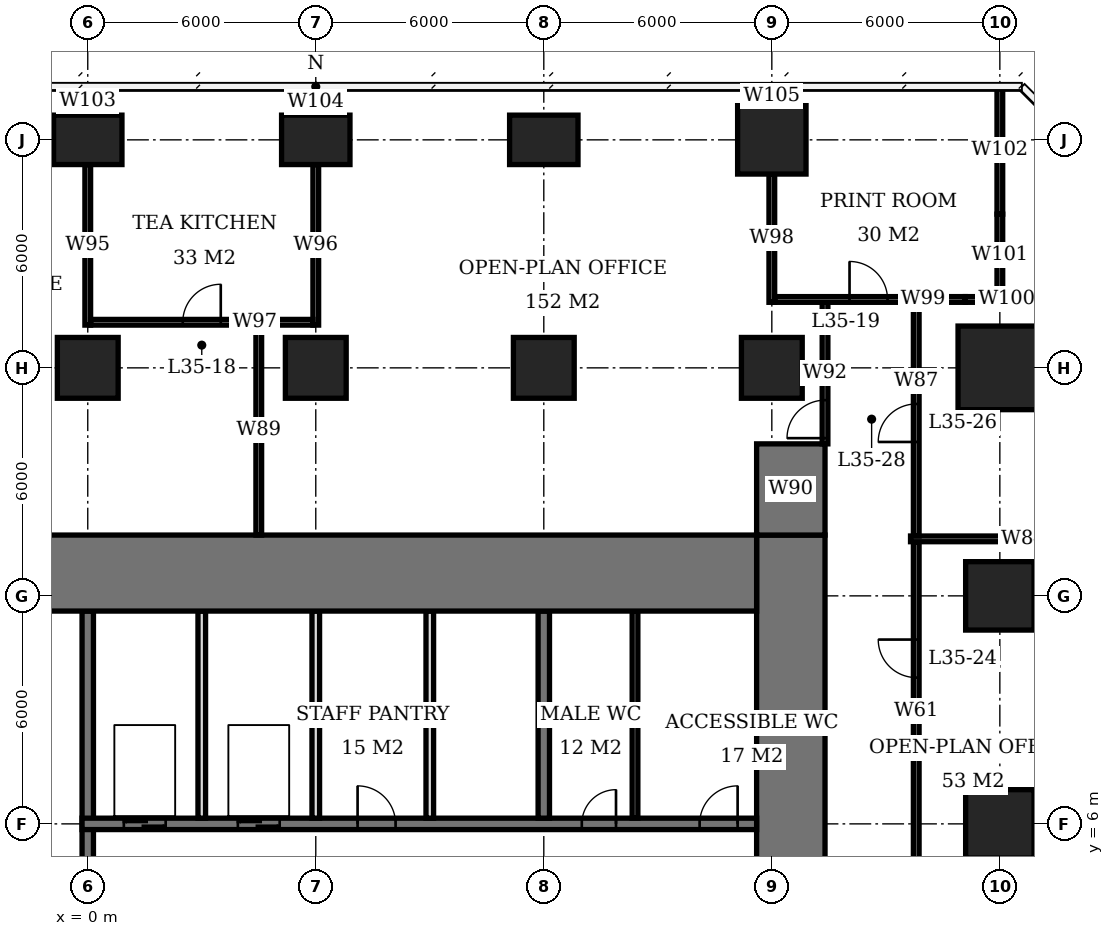
"""IFC4 building model, lengths in metres.
Left out: names, types, materials, properties, quantities, classifications, styles, units other than length and angle.
Written with IfcOpenShell. Run it as: python <this file> out.ifc"""

import sys

from ifc_helpers import new_model, si_unit, direction, frame, frame_2d, origin, origin_2d, place, context, subcontext, project, spatial, rectangle, extrude, element, fill, save


model = new_model("IFC4")
c1 = context("Model", 3, precision=1e-05, world=origin(), true_north=direction((0.0, 1.0)))
c2 = subcontext(c1, "Body", "Model", "MODEL_VIEW")
j1 = project(units=[si_unit("LENGTHUNIT", "METRE"), si_unit("PLANEANGLEUNIT", "RADIAN")], contexts=[c1])
p1 = place(None, origin())
s1 = spatial("IfcSite", under=j1, at=p1, CompositionType="ELEMENT")
p2 = place(p1, origin())
s2 = spatial("IfcBuilding", under=s1, at=p2, CompositionType="ELEMENT")
p3 = place(p2, frame((0.0, 0.0, 144.5)))
s3 = spatial("IfcBuildingStorey", under=s2, at=p3, CompositionType="ELEMENT", Elevation=144.5)
p4 = place(p3, frame((0.0, 18.0, 0.0), z_axis=(0.0, 0.0, 1.0), x_axis=(1.0, 0.0, 0.0)))
e1 = element("IfcColumn", 1, at=p4, inside=s3, PredefinedType="COLUMN", context=c2, shape_type="SweptSolid", body=[
    extrude(rectangle(XDim=1.6, YDim=1.6, at=origin_2d()), origin(), (0.0, 0.0, 1.0), 3.9),
])
p5 = place(p3, frame((0.0, 24.0, 0.0), z_axis=(0.0, 0.0, 1.0), x_axis=(1.0, 0.0, 0.0)))
e2 = element("IfcColumn", 2, at=p5, inside=s3, PredefinedType="COLUMN", context=c2, shape_type="SweptSolid", body=[
    extrude(rectangle(XDim=1.8, YDim=1.3, at=origin_2d()), origin(), (0.0, 0.0, 1.0), 3.9),
])
p6 = place(p3, frame((6.0, 18.0, 0.0), z_axis=(0.0, 0.0, 1.0), x_axis=(1.0, 0.0, 0.0)))
e3 = element("IfcColumn", 3, at=p6, inside=s3, PredefinedType="COLUMN", context=c2, shape_type="SweptSolid", body=[
    extrude(rectangle(XDim=1.6, YDim=1.6, at=origin_2d()), origin(), (0.0, 0.0, 1.0), 3.9),
])
p7 = place(p3, frame((6.0, 24.0, 0.0), z_axis=(0.0, 0.0, 1.0), x_axis=(1.0, 0.0, 0.0)))
e4 = element("IfcColumn", 4, at=p7, inside=s3, PredefinedType="COLUMN", context=c2, shape_type="SweptSolid", body=[
    extrude(rectangle(XDim=1.8, YDim=1.3, at=origin_2d()), origin(), (0.0, 0.0, 1.0), 3.9),
])
p8 = place(p3, frame((12.0, 18.0, 0.0), z_axis=(0.0, 0.0, 1.0), x_axis=(1.0, 0.0, 0.0)))
e5 = element("IfcColumn", 5, at=p8, inside=s3, PredefinedType="COLUMN", context=c2, shape_type="SweptSolid", body=[
    extrude(rectangle(XDim=1.6, YDim=1.6, at=origin_2d()), origin(), (0.0, 0.0, 1.0), 3.9),
])
p9 = place(p3, frame((12.0, 24.0, 0.0), z_axis=(0.0, 0.0, 1.0), x_axis=(1.0, 0.0, 0.0)))
e6 = element("IfcColumn", 6, at=p9, inside=s3, PredefinedType="COLUMN", context=c2, shape_type="SweptSolid", body=[
    extrude(rectangle(XDim=1.8, YDim=1.3, at=origin_2d()), origin(), (0.0, 0.0, 1.0), 3.9),
])
p10 = place(p3, frame((18.0, 18.0, 0.0), z_axis=(0.0, 0.0, 1.0), x_axis=(1.0, 0.0, 0.0)))
e7 = element("IfcColumn", 7, at=p10, inside=s3, PredefinedType="COLUMN", context=c2, shape_type="SweptSolid", body=[
    extrude(rectangle(XDim=1.6, YDim=1.6, at=origin_2d()), origin(), (0.0, 0.0, 1.0), 3.9),
])
for number, where, z_axis, x_axis in (
    (8, (18.0, 24.0, 0.0), (0.0, 0.0, 1.0), (1.0, 0.0, 0.0)),
    (9, (24.0, 6.0, 0.0), (0.0, 0.0, 1.0), (1.0, 0.0, 0.0)),
    (10, (24.0, 12.0, 0.0), (0.0, 0.0, 1.0), (1.0, 0.0, 0.0)),
):
    element("IfcColumn", number, at=place(p3, frame(where, z_axis=z_axis, x_axis=x_axis)), inside=s3, PredefinedType="COLUMN", context=c2, shape_type="SweptSolid", body=[
        extrude(rectangle(XDim=1.8, YDim=1.8, at=origin_2d()), origin(), (0.0, 0.0, 1.0), 3.9),
    ])
p11 = place(p3, frame((24.0, 18.0, 0.0), z_axis=(0.0, 0.0, 1.0), x_axis=(1.0, 0.0, 0.0)))
e11 = element("IfcColumn", 11, at=p11, inside=s3, PredefinedType="COLUMN", context=c2, shape_type="SweptSolid", body=[
    extrude(rectangle(XDim=2.2, YDim=2.2, at=origin_2d()), origin(), (0.0, 0.0, 1.0), 3.9),
])
p12 = place(p3, frame((-5.6, 12.6, 0.0), z_axis=(0.0, 0.0, 1.0), x_axis=(1.0, 0.0, 0.0)))
e12 = element("IfcWall", 12, at=p12, inside=s3, PredefinedType="SHEAR", context=c2, shape_type="SweptSolid", body=[
    extrude(rectangle(XDim=23.2, YDim=2.0, at=frame_2d((11.6, 0.0))), origin(), (0.0, 0.0, 1.0), 3.9),
])
p13 = place(p3, frame((18.5, -7.6, 0.0), z_axis=(0.0, 0.0, 1.0), x_axis=(0.0, 1.0, 0.0)))
e13 = element("IfcWall", 13, at=p13, inside=s3, PredefinedType="SHEAR", context=c2, shape_type="SweptSolid", body=[
    extrude(rectangle(XDim=21.2, YDim=1.8, at=frame_2d((10.6, 0.0))), origin(), (0.0, 0.0, 1.0), 3.9),
])
p14 = place(p13, frame((9.2, 0.0, 0.0)))
e14 = element("IfcOpeningElement", 14, at=p14, cuts=e13, PredefinedType="OPENING", context=c2, shape_type="SweptSolid", body=[
    extrude(rectangle(XDim=1.8, YDim=2.4, at=frame_2d((0.9, 1.2))), frame((0.0, 0.91, 0.0), z_axis=(0.0, -1.0, 0.0), x_axis=(1.0, 0.0, 0.0)), (0.0, 0.0, 1.0), 1.82),
])
p15 = place(p3, frame((18.5, 13.6, 0.0), z_axis=(0.0, 0.0, 1.0), x_axis=(0.0, 1.0, 0.0)))
e15 = element("IfcWall", 15, at=p15, inside=s3, PredefinedType="SHEAR", context=c2, shape_type="SweptSolid", body=[
    extrude(rectangle(XDim=2.4, YDim=1.8, at=frame_2d((1.2, 0.0))), origin(), (0.0, 0.0, 1.0), 3.9),
])
p16 = place(p3, frame((-0.15, 6.0, 0.0), z_axis=(0.0, 0.0, 1.0), x_axis=(1.0, 0.0, 0.0)))
e16 = element("IfcWall", 16, at=p16, inside=s3, PredefinedType="SHEAR", context=c2, shape_type="SweptSolid", body=[
    extrude(rectangle(XDim=17.75, YDim=0.3, at=frame_2d((8.875, 0.0))), origin(), (0.0, 0.0, 1.0), 3.9),
])
p17 = place(p16, frame((13.15, 0.0, 0.0)))
e17 = element("IfcOpeningElement", 17, at=p17, cuts=e16, PredefinedType="OPENING", context=c2, shape_type="SweptSolid", body=[
    extrude(rectangle(XDim=0.9, YDim=2.1, at=frame_2d((0.45, 1.05))), frame((0.0, 0.16, 0.0), z_axis=(0.0, -1.0, 0.0), x_axis=(1.0, 0.0, 0.0)), (0.0, 0.0, 1.0), 0.32),
])
p18 = place(p16, frame((16.25, 0.0, 0.0)))
e18 = element("IfcOpeningElement", 18, at=p18, cuts=e16, PredefinedType="OPENING", context=c2, shape_type="SweptSolid", body=[
    extrude(rectangle(XDim=1.0, YDim=2.1, at=frame_2d((0.5, 1.05))), frame((0.0, 0.16, 0.0), z_axis=(0.0, -1.0, 0.0), x_axis=(1.0, 0.0, 0.0)), (0.0, 0.0, 1.0), 0.32),
])
p19 = place(p16, frame((7.25, 0.0, 0.0)))
e19 = element("IfcOpeningElement", 19, at=p19, cuts=e16, PredefinedType="OPENING", context=c2, shape_type="SweptSolid", body=[
    extrude(rectangle(XDim=1.0, YDim=2.1, at=frame_2d((0.5, 1.05))), frame((0.0, 0.16, 0.0), z_axis=(0.0, -1.0, 0.0), x_axis=(1.0, 0.0, 0.0)), (0.0, 0.0, 1.0), 0.32),
])
p20 = place(p16, frame((1.1, 0.0, 0.0)))
e20 = element("IfcOpeningElement", 20, at=p20, cuts=e16, PredefinedType="OPENING", context=c2, shape_type="SweptSolid", body=[
    extrude(rectangle(XDim=1.1, YDim=2.1, at=frame_2d((0.55, 1.05))), frame((0.0, 0.16, 0.0), z_axis=(0.0, -1.0, 0.0), x_axis=(1.0, 0.0, 0.0)), (0.0, 0.0, 1.0), 0.32),
])
p21 = place(p16, frame((4.1, 0.0, 0.0)))
e21 = element("IfcOpeningElement", 21, at=p21, cuts=e16, PredefinedType="OPENING", context=c2, shape_type="SweptSolid", body=[
    extrude(rectangle(XDim=1.1, YDim=2.1, at=frame_2d((0.55, 1.05))), frame((0.0, 0.16, 0.0), z_axis=(0.0, -1.0, 0.0), x_axis=(1.0, 0.0, 0.0)), (0.0, 0.0, 1.0), 0.32),
])
p22 = place(p3, frame((0.0, 3.15, 0.0), z_axis=(0.0, 0.0, 1.0), x_axis=(0.0, 1.0, 0.0)))
e22 = element("IfcWall", 22, at=p22, inside=s3, PredefinedType="SHEAR", context=c2, shape_type="SweptSolid", body=[
    extrude(rectangle(XDim=8.45, YDim=0.3, at=frame_2d((4.225, 0.0))), origin(), (0.0, 0.0, 1.0), 3.9),
])
p23 = place(p3, frame((12.0, 6.15, 0.0), z_axis=(0.0, 0.0, 1.0), x_axis=(0.0, 1.0, 0.0)))
e23 = element("IfcWall", 23, at=p23, inside=s3, PredefinedType="SHEAR", context=c2, shape_type="SweptSolid", body=[
    extrude(rectangle(XDim=5.45, YDim=0.3, at=frame_2d((2.725, 0.0))), origin(), (0.0, 0.0, 1.0), 3.9),
])
for number, where, z_axis, x_axis in (
    (24, (3.0, 6.15, 0.0), (0.0, 0.0, 1.0), (0.0, 1.0, 0.0)),
    (25, (6.0, 6.15, 0.0), (0.0, 0.0, 1.0), (0.0, 1.0, 0.0)),
    (26, (9.0, 6.15, 0.0), (0.0, 0.0, 1.0), (0.0, 1.0, 0.0)),
):
    element("IfcWall", number, at=place(p3, frame(where, z_axis=z_axis, x_axis=x_axis)), inside=s3, PredefinedType="SOLIDWALL", context=c2, shape_type="SweptSolid", body=[
        extrude(rectangle(XDim=5.45, YDim=0.2, at=frame_2d((2.725, 0.0))), origin(), (0.0, 0.0, 1.0), 3.9),
    ])
p24 = place(p3, frame((14.4, 6.15, 0.0), z_axis=(0.0, 0.0, 1.0), x_axis=(0.0, 1.0, 0.0)))
e27 = element("IfcWall", 27, at=p24, inside=s3, PredefinedType="PLUMBINGWALL", context=c2, shape_type="SweptSolid", body=[
    extrude(rectangle(XDim=5.45, YDim=0.15, at=frame_2d((2.725, 0.0))), origin(), (0.0, 0.0, 1.0), 3.65),
])
p25 = place(p3, frame((0.075, 19.2, 0.0), z_axis=(0.0, 0.0, 1.0), x_axis=(1.0, 0.0, 0.0)))
e28 = element("IfcWall", 28, at=p25, inside=s3, PredefinedType="PARTITIONING", context=c2, shape_type="SweptSolid", body=[
    extrude(rectangle(XDim=5.85, YDim=0.15, at=frame_2d((2.925, 0.0))), origin(), (0.0, 0.0, 1.0), 3.65),
])
p26 = place(p25, frame((2.425, 0.0, 0.0)))
e29 = element("IfcOpeningElement", 29, at=p26, cuts=e28, PredefinedType="OPENING", context=c2, shape_type="SweptSolid", body=[
    extrude(rectangle(XDim=1.0, YDim=2.1, at=frame_2d((0.5, 1.05))), frame((0.0, 0.085, 0.0), z_axis=(0.0, -1.0, 0.0), x_axis=(1.0, 0.0, 0.0)), (0.0, 0.0, 1.0), 0.17),
])
p27 = place(p3, frame((18.075, 19.8, 0.0), z_axis=(0.0, 0.0, 1.0), x_axis=(1.0, 0.0, 0.0)))
e30 = element("IfcWall", 30, at=p27, inside=s3, PredefinedType="PARTITIONING", context=c2, shape_type="SweptSolid", body=[
    extrude(rectangle(XDim=5.015, YDim=0.15, at=frame_2d((2.508, 0.0))), origin(), (0.0, 0.0, 1.0), 3.65),
])
p28 = place(p27, frame((1.97, 0.0, 0.0)))
e31 = element("IfcOpeningElement", 31, at=p28, cuts=e30, PredefinedType="OPENING", context=c2, shape_type="SweptSolid", body=[
    extrude(rectangle(XDim=1.0, YDim=2.1, at=frame_2d((0.5, 1.05))), frame((0.0, 0.085, 0.0), z_axis=(0.0, -1.0, 0.0), x_axis=(1.0, 0.0, 0.0)), (0.0, 0.0, 1.0), 0.17),
])
p29 = place(p3, frame((23.09, 19.8, 0.0), z_axis=(0.0, 0.0, 1.0), x_axis=(1.0, 0.0, 0.0)))
e32 = element("IfcWall", 32, at=p29, inside=s3, PredefinedType="PARTITIONING", context=c2, shape_type="SweptSolid", body=[
    extrude(rectangle(XDim=0.985, YDim=0.15, at=frame_2d((0.492, 0.0))), origin(), (0.0, 0.0, 1.0), 2.65),
])
p30 = place(p3, frame((0.0, 19.125, 0.0), z_axis=(0.0, 0.0, 1.0), x_axis=(0.0, 1.0, 0.0)))
e33 = element("IfcWall", 33, at=p30, inside=s3, PredefinedType="PARTITIONING", context=c2, shape_type="SweptSolid", body=[
    extrude(rectangle(XDim=4.225, YDim=0.15, at=frame_2d((2.113, 0.0))), origin(), (0.0, 0.0, 1.0), 3.65),
])
p31 = place(p3, frame((0.0, 24.65, 0.0), z_axis=(0.0, 0.0, 1.0), x_axis=(0.0, 1.0, 0.0)))
e34 = element("IfcWall", 34, at=p31, inside=s3, PredefinedType="PARTITIONING", context=c2, shape_type="SweptSolid", body=[
    extrude(rectangle(XDim=0.75, YDim=0.15, at=frame_2d((0.375, 0.0))), origin(), (0.0, 0.0, 1.0), 3.65),
])
p32 = place(p3, frame((6.0, 19.125, 0.0), z_axis=(0.0, 0.0, 1.0), x_axis=(0.0, 1.0, 0.0)))
e35 = element("IfcWall", 35, at=p32, inside=s3, PredefinedType="PARTITIONING", context=c2, shape_type="SweptSolid", body=[
    extrude(rectangle(XDim=4.225, YDim=0.15, at=frame_2d((2.113, 0.0))), origin(), (0.0, 0.0, 1.0), 3.65),
])
p33 = place(p3, frame((6.0, 24.65, 0.0), z_axis=(0.0, 0.0, 1.0), x_axis=(0.0, 1.0, 0.0)))
e36 = element("IfcWall", 36, at=p33, inside=s3, PredefinedType="PARTITIONING", context=c2, shape_type="SweptSolid", body=[
    extrude(rectangle(XDim=0.7, YDim=0.15, at=frame_2d((0.35, 0.0))), origin(), (0.0, 0.0, 1.0), 3.65),
])
p34 = place(p3, frame((18.0, 19.725, 0.0), z_axis=(0.0, 0.0, 1.0), x_axis=(0.0, 1.0, 0.0)))
e37 = element("IfcWall", 37, at=p34, inside=s3, PredefinedType="PARTITIONING", context=c2, shape_type="SweptSolid", body=[
    extrude(rectangle(XDim=3.375, YDim=0.15, at=frame_2d((1.688, 0.0))), origin(), (0.0, 0.0, 1.0), 3.65),
])
p35 = place(p3, frame((18.0, 24.9, 0.0), z_axis=(0.0, 0.0, 1.0), x_axis=(0.0, 1.0, 0.0)))
e38 = element("IfcWall", 38, at=p35, inside=s3, PredefinedType="PARTITIONING", context=c2, shape_type="SweptSolid", body=[
    extrude(rectangle(XDim=0.5, YDim=0.15, at=frame_2d((0.25, 0.0))), origin(), (0.0, 0.0, 1.0), 3.65),
])
p36 = place(p3, frame((24.0, 19.875, 0.0), z_axis=(0.0, 0.0, 1.0), x_axis=(0.0, 1.0, 0.0)))
e39 = element("IfcWall", 39, at=p36, inside=s3, PredefinedType="PARTITIONING", context=c2, shape_type="SweptSolid", body=[
    extrude(rectangle(XDim=2.17, YDim=0.15, at=frame_2d((1.085, 0.0))), origin(), (0.0, 0.0, 1.0), 2.65),
])
p37 = place(p3, frame((24.0, 22.045, 0.0), z_axis=(0.0, 0.0, 1.0), x_axis=(0.0, 1.0, 0.0)))
e40 = element("IfcWall", 40, at=p37, inside=s3, PredefinedType="PARTITIONING", context=c2, shape_type="SweptSolid", body=[
    extrude(rectangle(XDim=3.355, YDim=0.15, at=frame_2d((1.677, 0.0))), origin(), (0.0, 0.0, 1.0), 3.65),
])
p38 = place(p3, frame((4.5, 13.6, 0.0), z_axis=(0.0, 0.0, 1.0), x_axis=(0.0, 1.0, 0.0)))
e41 = element("IfcWall", 41, at=p38, inside=s3, PredefinedType="PARTITIONING", context=c2, shape_type="SweptSolid", body=[
    extrude(rectangle(XDim=5.525, YDim=0.15, at=frame_2d((2.762, 0.0))), origin(), (0.0, 0.0, 1.0), 3.65),
])
p39 = place(p3, frame((19.4, 16.0, 0.0), z_axis=(0.0, 0.0, 1.0), x_axis=(0.0, 1.0, 0.0)))
e42 = element("IfcWall", 42, at=p39, inside=s3, PredefinedType="PARTITIONING", context=c2, shape_type="SweptSolid", body=[
    extrude(rectangle(XDim=3.725, YDim=0.15, at=frame_2d((1.863, 0.0))), origin(), (0.0, 0.0, 1.0), 3.65),
])
p40 = place(p39, frame((0.15, 0.0, 0.0)))
e43 = element("IfcOpeningElement", 43, at=p40, cuts=e42, PredefinedType="OPENING", context=c2, shape_type="SweptSolid", body=[
    extrude(rectangle(XDim=1.0, YDim=2.1, at=frame_2d((0.5, 1.05))), frame((0.0, 0.085, 0.0), z_axis=(0.0, -1.0, 0.0), x_axis=(1.0, 0.0, 0.0)), (0.0, 0.0, 1.0), 0.17),
])
p41 = place(p3, frame((21.8, 4.5, 0.0), z_axis=(0.0, 0.0, 1.0), x_axis=(0.0, 1.0, 0.0)))
e44 = element("IfcWall", 44, at=p41, inside=s3, PredefinedType="PARTITIONING", context=c2, shape_type="SweptSolid", body=[
    extrude(rectangle(XDim=8.925, YDim=0.15, at=frame_2d((4.462, 0.0))), origin(), (0.0, 0.0, 1.0), 3.65),
])
p42 = place(p41, frame((5.35, 0.0, 0.0)))
e45 = element("IfcOpeningElement", 45, at=p42, cuts=e44, PredefinedType="OPENING", context=c2, shape_type="SweptSolid", body=[
    extrude(rectangle(XDim=1.0, YDim=2.1, at=frame_2d((0.5, 1.05))), frame((0.0, 0.085, 0.0), z_axis=(0.0, -1.0, 0.0), x_axis=(1.0, 0.0, 0.0)), (0.0, 0.0, 1.0), 0.17),
])
p43 = place(p3, frame((21.8, 13.575, 0.0), z_axis=(0.0, 0.0, 1.0), x_axis=(0.0, 1.0, 0.0)))
e46 = element("IfcWall", 46, at=p43, inside=s3, PredefinedType="PARTITIONING", context=c2, shape_type="SweptSolid", body=[
    extrude(rectangle(XDim=6.15, YDim=0.15, at=frame_2d((3.075, 0.0))), origin(), (0.0, 0.0, 1.0), 3.65),
])
p44 = place(p43, frame((2.475, 0.0, 0.0)))
e47 = element("IfcOpeningElement", 47, at=p44, cuts=e46, PredefinedType="OPENING", context=c2, shape_type="SweptSolid", body=[
    extrude(rectangle(XDim=1.0, YDim=2.1, at=frame_2d((0.5, 1.05))), frame((0.0, 0.085, 0.0), z_axis=(0.0, -1.0, 0.0), x_axis=(1.0, 0.0, 0.0)), (0.0, 0.0, 1.0), 0.17),
])
p45 = place(p3, frame((21.65, 13.5, 0.0), z_axis=(0.0, 0.0, 1.0), x_axis=(1.0, 0.0, 0.0)))
e48 = element("IfcWall", 48, at=p45, inside=s3, PredefinedType="PARTITIONING", context=c2, shape_type="SweptSolid", body=[
    extrude(rectangle(XDim=5.94, YDim=0.15, at=frame_2d((2.97, 0.0))), origin(), (0.0, 0.0, 1.0), 3.65),
])
p46 = place(p17, origin())
e49 = element("IfcDoor", 49, at=p46, inside=s3, OperationType="SINGLE_SWING_RIGHT", PredefinedType="DOOR", context=c2, shape_type="SweptSolid", body=[
    extrude(rectangle(XDim=0.9, YDim=2.1, at=frame_2d((0.45, 1.05))), frame((0.0, 0.025, 0.0), z_axis=(0.0, -1.0, 0.0), x_axis=(1.0, 0.0, 0.0)), (0.0, 0.0, 1.0), 0.05),
])
fill(e17, e49)
p47 = place(p18, origin())
e50 = element("IfcDoor", 50, at=p47, inside=s3, OperationType="SINGLE_SWING_RIGHT", PredefinedType="DOOR", context=c2, shape_type="SweptSolid", body=[
    extrude(rectangle(XDim=1.0, YDim=2.1, at=frame_2d((0.5, 1.05))), frame((0.0, 0.025, 0.0), z_axis=(0.0, -1.0, 0.0), x_axis=(1.0, 0.0, 0.0)), (0.0, 0.0, 1.0), 0.05),
])
fill(e18, e50)
p48 = place(p19, origin())
e51 = element("IfcDoor", 51, at=p48, inside=s3, OperationType="SINGLE_SWING_LEFT", PredefinedType="DOOR", context=c2, shape_type="SweptSolid", body=[
    extrude(rectangle(XDim=1.0, YDim=2.1, at=frame_2d((0.5, 1.05))), frame((0.0, 0.025, 0.0), z_axis=(0.0, -1.0, 0.0), x_axis=(1.0, 0.0, 0.0)), (0.0, 0.0, 1.0), 0.05),
])
fill(e19, e51)
p49 = place(p20, origin())
e52 = element("IfcDoor", 52, at=p49, inside=s3, OperationType="DOUBLE_DOOR_SLIDING", PredefinedType="USERDEFINED", context=c2, shape_type="SweptSolid", body=[
    extrude(rectangle(XDim=1.1, YDim=2.1, at=frame_2d((0.55, 1.05))), frame((0.0, 0.025, 0.0), z_axis=(0.0, -1.0, 0.0), x_axis=(1.0, 0.0, 0.0)), (0.0, 0.0, 1.0), 0.05),
])
fill(e20, e52)
p50 = place(p21, origin())
e53 = element("IfcDoor", 53, at=p50, inside=s3, OperationType="DOUBLE_DOOR_SLIDING", PredefinedType="USERDEFINED", context=c2, shape_type="SweptSolid", body=[
    extrude(rectangle(XDim=1.1, YDim=2.1, at=frame_2d((0.55, 1.05))), frame((0.0, 0.025, 0.0), z_axis=(0.0, -1.0, 0.0), x_axis=(1.0, 0.0, 0.0)), (0.0, 0.0, 1.0), 0.05),
])
fill(e21, e53)
p51 = place(p26, origin())
e54 = element("IfcDoor", 54, at=p51, inside=s3, OperationType="SINGLE_SWING_RIGHT", PredefinedType="DOOR", context=c2, shape_type="SweptSolid", body=[
    extrude(rectangle(XDim=1.0, YDim=2.1, at=frame_2d((0.5, 1.05))), frame((0.0, 0.025, 0.0), z_axis=(0.0, -1.0, 0.0), x_axis=(1.0, 0.0, 0.0)), (0.0, 0.0, 1.0), 0.05),
])
fill(e29, e54)
p52 = place(p28, origin())
e55 = element("IfcDoor", 55, at=p52, inside=s3, OperationType="SINGLE_SWING_LEFT", PredefinedType="DOOR", context=c2, shape_type="SweptSolid", body=[
    extrude(rectangle(XDim=1.0, YDim=2.1, at=frame_2d((0.5, 1.05))), frame((0.0, 0.025, 0.0), z_axis=(0.0, -1.0, 0.0), x_axis=(1.0, 0.0, 0.0)), (0.0, 0.0, 1.0), 0.05),
])
fill(e31, e55)
p53 = place(p42, origin())
e56 = element("IfcDoor", 56, at=p53, inside=s3, OperationType="SINGLE_SWING_RIGHT", PredefinedType="DOOR", context=c2, shape_type="SweptSolid", body=[
    extrude(rectangle(XDim=1.0, YDim=2.1, at=frame_2d((0.5, 1.05))), frame((0.0, 0.025, 0.0), z_axis=(0.0, -1.0, 0.0), x_axis=(1.0, 0.0, 0.0)), (0.0, 0.0, 1.0), 0.05),
])
fill(e45, e56)
p54 = place(p44, origin())
e57 = element("IfcDoor", 57, at=p54, inside=s3, OperationType="SINGLE_SWING_LEFT", PredefinedType="DOOR", context=c2, shape_type="SweptSolid", body=[
    extrude(rectangle(XDim=1.0, YDim=2.1, at=frame_2d((0.5, 1.05))), frame((0.0, 0.025, 0.0), z_axis=(0.0, -1.0, 0.0), x_axis=(1.0, 0.0, 0.0)), (0.0, 0.0, 1.0), 0.05),
])
fill(e47, e57)
p55 = place(p40, origin())
e58 = element("IfcDoor", 58, at=p55, inside=s3, OperationType="SINGLE_SWING_LEFT", PredefinedType="DOOR", context=c2, shape_type="SweptSolid", body=[
    extrude(rectangle(XDim=1.0, YDim=2.1, at=frame_2d((0.5, 1.05))), frame((0.0, 0.025, 0.0), z_axis=(0.0, -1.0, 0.0), x_axis=(1.0, 0.0, 0.0)), (0.0, 0.0, 1.0), 0.05),
])
fill(e43, e58)
save(model, sys.argv[1])
